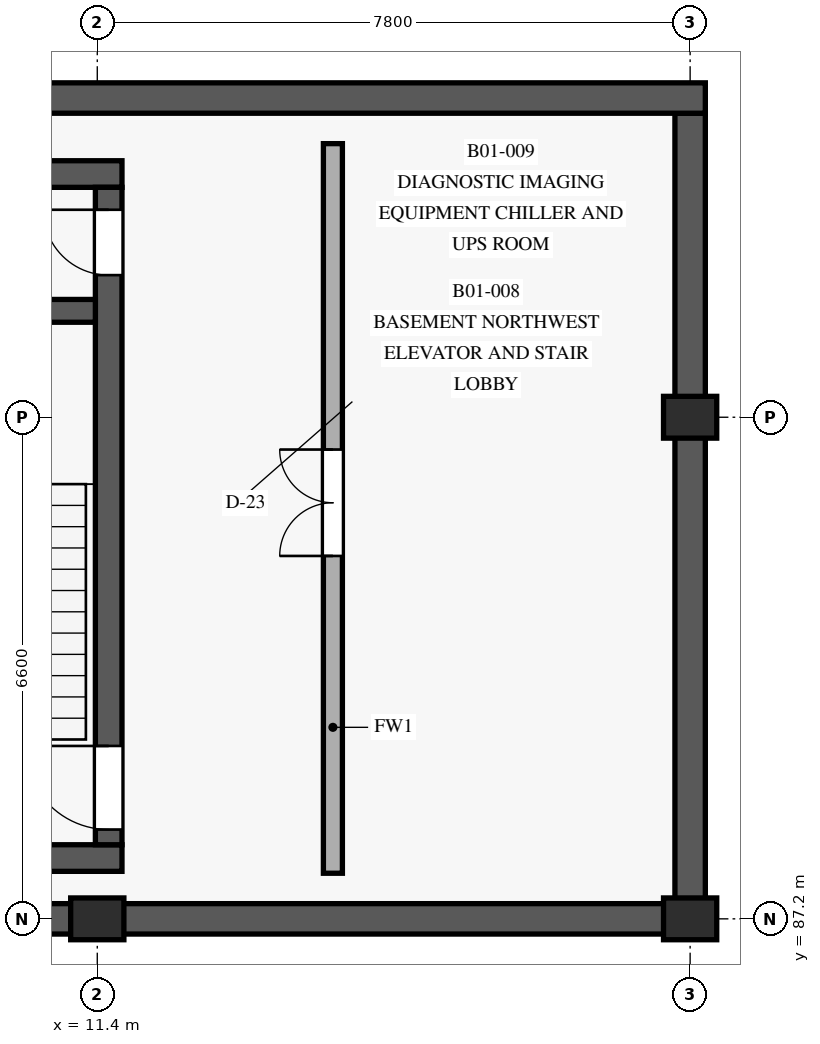
"""IFC4 building model, lengths in metres.
Left out: names, types, materials, properties, quantities, classifications, styles, units other than length and angle.
Written with IfcOpenShell. Run it as: python <this file> out.ifc"""

import sys

from ifc_helpers import new_model, si_unit, direction, frame, frame_2d, origin, origin_with_axes, origin_2d, place, context, subcontext, project, spatial, rectangle, extrude, element, fill, save


model = new_model("IFC4")
c1 = context("Model", 3, precision=1e-05, world=origin(), true_north=direction((0.0, 1.0)))
c2 = subcontext(c1, "Body", "Model", "MODEL_VIEW")
j1 = project(units=[si_unit("LENGTHUNIT", "METRE"), si_unit("PLANEANGLEUNIT", "RADIAN")], contexts=[c1])
p1 = place(None, origin())
s1 = spatial("IfcSite", under=j1, at=p1, CompositionType="ELEMENT")
p2 = place(p1, origin())
s2 = spatial("IfcBuilding", under=s1, at=p2, CompositionType="ELEMENT")
p3 = place(p2, frame((0.0, 0.0, -4.5)))
s3 = spatial("IfcBuildingStorey", under=s2, at=p3, CompositionType="ELEMENT", Elevation=-4.5)
for number, where, z_axis, x_axis in (
    (1, (11.4, 87.2, 0.0), (0.0, 0.0, 1.0), (1.0, 0.0, 0.0)),
    (2, (19.2, 87.2, 0.0), (0.0, 0.0, 1.0), (1.0, 0.0, 0.0)),
    (3, (19.2, 93.8, 0.0), (0.0, 0.0, 1.0), (1.0, 0.0, 0.0)),
):
    element("IfcColumn", number, at=place(p3, frame(where, z_axis=z_axis, x_axis=x_axis)), inside=s3, PredefinedType="COLUMN", context=c2, shape_type="SweptSolid", body=[
        extrude(rectangle(XDim=0.7, YDim=0.55, at=origin_2d()), origin(), (0.0, 0.0, 1.0), 4.5),
    ])
p4 = place(p3, frame((4.4, 87.2, 0.0), z_axis=(0.0, 0.0, 1.0), x_axis=(1.0, 0.0, 0.0)))
e4 = element("IfcWall", 4, at=p4, inside=s3, PredefinedType="SHEAR", context=c2, shape_type="SweptSolid", body=[
    extrude(rectangle(XDim=15.0, YDim=0.4, at=frame_2d((7.5, 0.0))), origin(), (0.0, 0.0, 1.0), 4.15),
])
p5 = place(p3, frame((19.2, 87.4, 0.0), z_axis=(0.0, 0.0, 1.0), x_axis=(0.0, 1.0, 0.0)))
e5 = element("IfcWall", 5, at=p5, inside=s3, PredefinedType="SHEAR", context=c2, shape_type="SweptSolid", body=[
    extrude(rectangle(XDim=10.4, YDim=0.4, at=frame_2d((5.2, 0.0))), origin(), (0.0, 0.0, 1.0), 4.15),
])
p6 = place(p3, frame((19.4, 98.0, 0.0), z_axis=(0.0, 0.0, 1.0), x_axis=(-1.0, 0.0, 0.0)))
e6 = element("IfcWall", 6, at=p6, inside=s3, PredefinedType="SHEAR", context=c2, shape_type="SweptSolid", body=[
    extrude(rectangle(XDim=15.0, YDim=0.4, at=frame_2d((7.5, 0.0))), origin(), (0.0, 0.0, 1.0), 4.15),
])
for number, where, z_axis, x_axis in (
    (7, (7.375, 88.0, 0.0), (0.0, 0.0, 1.0), (1.0, 0.0, 0.0)),
    (8, (11.725, 97.0, 0.0), (0.0, 0.0, 1.0), (-1.0, 0.0, 0.0)),
):
    element("IfcWall", number, at=place(p3, frame(where, z_axis=z_axis, x_axis=x_axis)), inside=s3, PredefinedType="SHEAR", context=c2, shape_type="SweptSolid", body=[
        extrude(rectangle(XDim=4.35, YDim=0.35, at=frame_2d((2.175, 0.0))), origin(), (0.0, 0.0, 1.0), 4.12),
    ])
p7 = place(p3, frame((11.55, 88.175, 0.0), z_axis=(0.0, 0.0, 1.0), x_axis=(0.0, 1.0, 0.0)))
e9 = element("IfcWall", 9, at=p7, inside=s3, PredefinedType="SHEAR", context=c2, shape_type="SweptSolid", body=[
    extrude(rectangle(XDim=8.65, YDim=0.35, at=frame_2d((4.325, 0.0))), origin(), (0.0, 0.0, 1.0), 4.12),
])
p8 = place(p7, frame((0.2, 0.0, 0.0)))
e10 = element("IfcOpeningElement", 10, at=p8, cuts=e9, PredefinedType="OPENING", context=c2, shape_type="SweptSolid", body=[
    extrude(rectangle(XDim=1.1, YDim=2.2, at=frame_2d((0.55, 1.1))), frame((0.0, 0.185, 0.0), z_axis=(0.0, -1.0, 0.0), x_axis=(1.0, 0.0, 0.0)), (0.0, 0.0, 1.0), 0.37),
])
p9 = place(p7, frame((7.495, 0.0, 0.0)))
e11 = element("IfcOpeningElement", 11, at=p9, cuts=e9, PredefinedType="OPENING", context=c2, shape_type="SweptSolid", body=[
    extrude(rectangle(XDim=0.86, YDim=2.05, at=frame_2d((0.43, 1.025))), frame((0.0, 0.185, 0.0), z_axis=(0.0, -1.0, 0.0), x_axis=(1.0, 0.0, 0.0)), (0.0, 0.0, 1.0), 0.37),
])
p10 = place(p3, frame((7.725, 95.2, 0.0), z_axis=(0.0, 0.0, 1.0), x_axis=(1.0, 0.0, 0.0)))
e12 = element("IfcWall", 12, at=p10, inside=s3, PredefinedType="SHEAR", context=c2, shape_type="SweptSolid", body=[
    extrude(rectangle(XDim=3.65, YDim=0.3, at=frame_2d((1.825, 0.0))), origin(), (0.0, 0.0, 1.0), 4.12),
])
p11 = place(p3, frame((14.5, 87.8, 0.0), z_axis=(0.0, 0.0, 1.0), x_axis=(0.0, 1.0, 0.0)))
e13 = element("IfcWall", 13, at=p11, inside=s3, PredefinedType="SOLIDWALL", context=c2, shape_type="SweptSolid", body=[
    extrude(rectangle(XDim=9.6, YDim=0.25, at=frame_2d((4.8, 0.0))), origin(), (0.0, 0.0, 1.0), 3.515),
])
p12 = place(p11, frame((4.175, 0.0, 0.0)))
e14 = element("IfcOpeningElement", 14, at=p12, cuts=e13, PredefinedType="OPENING", context=c2, shape_type="SweptSolid", body=[
    extrude(rectangle(XDim=1.4, YDim=2.35, at=frame_2d((0.7, 1.175))), frame((0.0, 0.135, 0.0), z_axis=(0.0, -1.0, 0.0), x_axis=(1.0, 0.0, 0.0)), (0.0, 0.0, 1.0), 0.27),
])
p13 = place(p8, origin_with_axes())
e15 = element("IfcDoor", 15, at=p13, inside=s3, OperationType="SINGLE_SWING_RIGHT", PredefinedType="DOOR", context=c2, shape_type="SweptSolid", body=[
    extrude(rectangle(XDim=1.1, YDim=2.2, at=frame_2d((0.55, 1.1))), frame((0.0, 0.025, 0.0), z_axis=(0.0, -1.0, 0.0), x_axis=(1.0, 0.0, 0.0)), (0.0, 0.0, 1.0), 0.05),
])
fill(e10, e15)
p14 = place(p9, origin_with_axes())
e16 = element("IfcDoor", 16, at=p14, inside=s3, OperationType="SINGLE_SWING_RIGHT", PredefinedType="DOOR", context=c2, shape_type="SweptSolid", body=[
    extrude(rectangle(XDim=0.86, YDim=2.05, at=frame_2d((0.43, 1.025))), frame((0.0, 0.025, 0.0), z_axis=(0.0, -1.0, 0.0), x_axis=(1.0, 0.0, 0.0)), (0.0, 0.0, 1.0), 0.05),
])
fill(e11, e16)
p15 = place(p12, origin_with_axes())
e17 = element("IfcDoor", 17, at=p15, inside=s3, OperationType="DOUBLE_DOOR_SINGLE_SWING", PredefinedType="DOOR", context=c2, shape_type="SweptSolid", body=[
    extrude(rectangle(XDim=1.4, YDim=2.35, at=frame_2d((0.7, 1.175))), frame((0.0, 0.025, 0.0), z_axis=(0.0, -1.0, 0.0), x_axis=(1.0, 0.0, 0.0)), (0.0, 0.0, 1.0), 0.05),
])
fill(e14, e17)
save(model, sys.argv[1])
